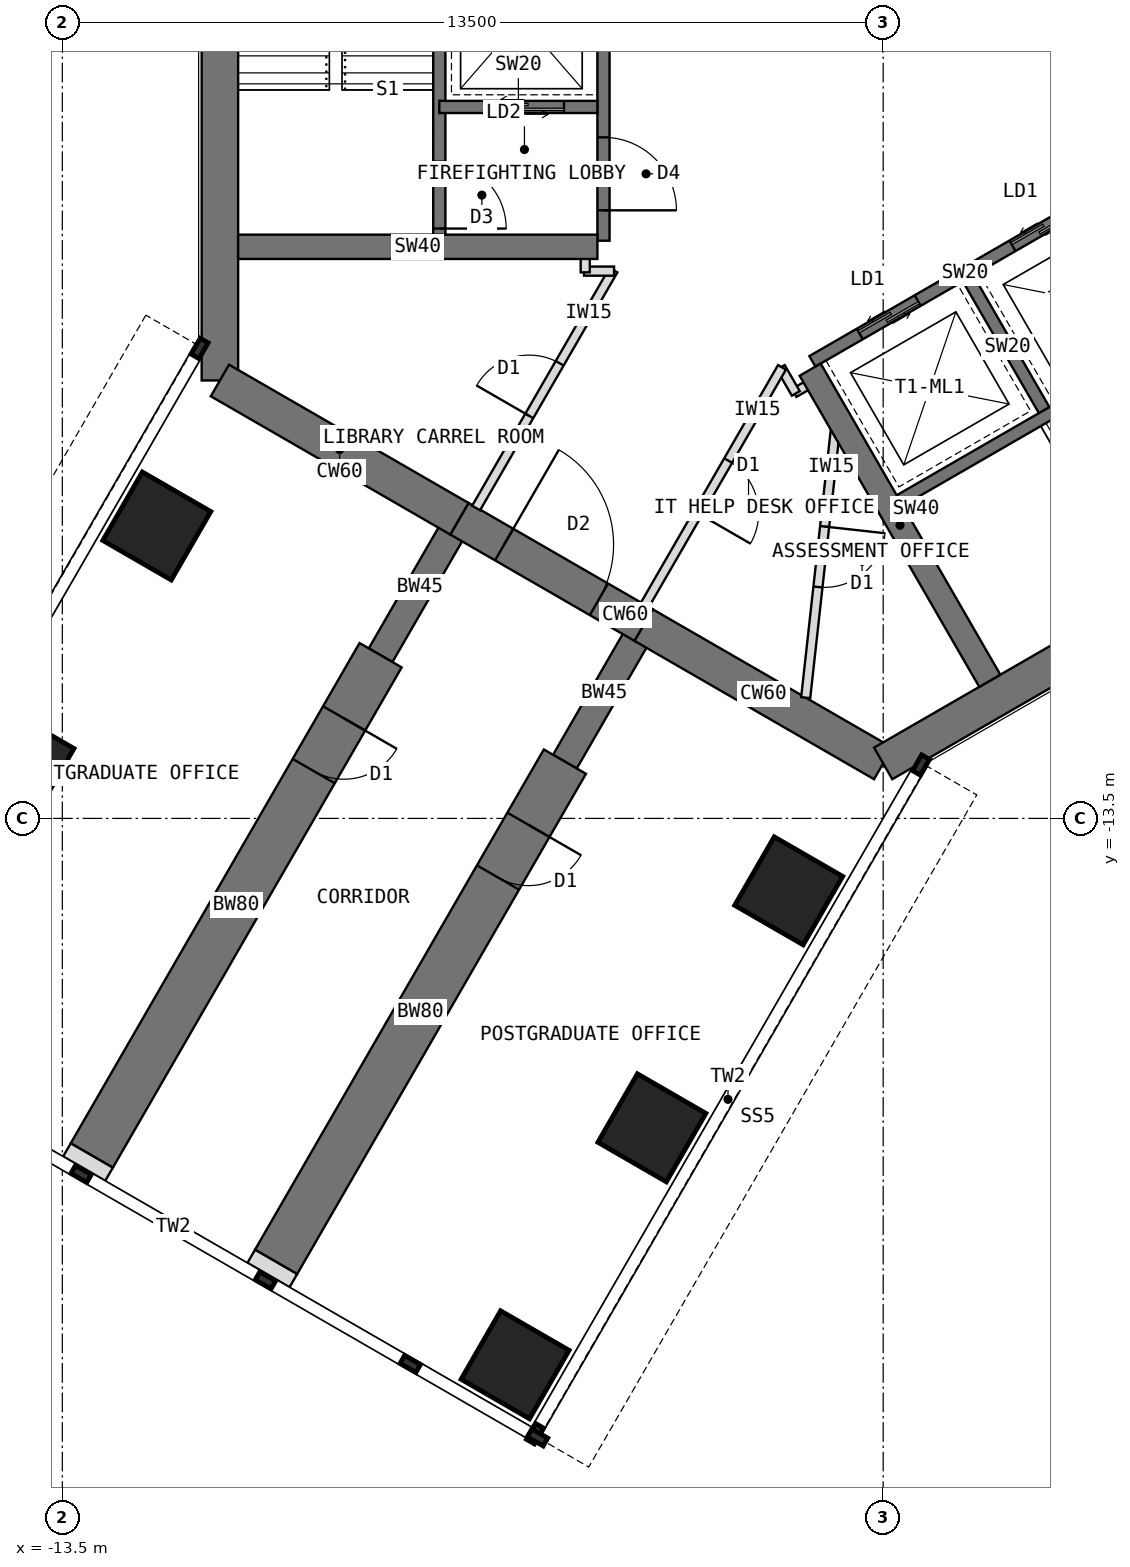
"""IFC4 building model, lengths in metres.
Left out: names, types, materials, properties, quantities, classifications, styles, units other than length and angle.
Written with IfcOpenShell. Run it as: python <this file> out.ifc"""

import sys

from ifc_helpers import new_model, si_unit, direction, frame, frame_2d, origin, origin_2d, place, context, subcontext, project, spatial, rectangle, extrude, element, fill, save


model = new_model("IFC4")
c1 = context("Model", 3, precision=1e-05, world=origin(), true_north=direction((0.0, 1.0)))
c2 = subcontext(c1, "Body", "Model", "MODEL_VIEW")
j1 = project(units=[si_unit("LENGTHUNIT", "METRE"), si_unit("PLANEANGLEUNIT", "RADIAN")], contexts=[c1])
p1 = place(None, origin())
s1 = spatial("IfcSite", under=j1, at=p1, CompositionType="ELEMENT")
p2 = place(p1, origin())
s2 = spatial("IfcBuilding", under=s1, at=p2, CompositionType="ELEMENT")
p3 = place(p2, frame((0.0, 0.0, 125.5)))
s3 = spatial("IfcBuildingStorey", under=s2, at=p3, CompositionType="ELEMENT", Elevation=125.5)
p4 = place(p3, frame((-10.908, 6.298, 0.0), z_axis=(0.0, 0.0, 1.0), x_axis=(0.0, -1.0, 0.0)))
e1 = element("IfcWall", 1, at=p4, inside=s3, PredefinedType="SHEAR", context=c2, shape_type="SweptSolid", body=[
    extrude(rectangle(XDim=12.596, YDim=0.6, at=frame_2d((6.298, 0.0))), origin(), (0.0, 0.0, 1.0), 4.0),
])
p5 = place(p3, frame((-10.908, -6.298, 0.0), z_axis=(0.0, 0.0, 1.0), x_axis=(0.866034513004, -0.499984222037, 0.0)))
e2 = element("IfcWall", 2, at=p5, inside=s3, PredefinedType="SHEAR", context=c2, shape_type="SweptSolid", body=[
    extrude(rectangle(XDim=4.548, YDim=0.6, at=frame_2d((2.274, 0.0))), origin(), (0.0, 0.0, 1.0), 4.0),
])
p6 = place(p3, frame((-6.97, -8.572, 0.0), z_axis=(0.0, 0.0, 1.0), x_axis=(0.866019471182, -0.500010275428, 0.0)))
e3 = element("IfcWall", 3, at=p6, inside=s3, PredefinedType="SHEAR", context=c2, shape_type="SweptSolid", body=[
    extrude(rectangle(XDim=3.5, YDim=0.6, at=frame_2d((1.75, 0.0))), origin(), (0.0, 0.0, 1.0), 4.0),
])
p7 = place(p6, frame((0.85, 0.0, 0.0)))
e4 = element("IfcOpeningElement", 4, at=p7, cuts=e3, PredefinedType="OPENING", context=c2, shape_type="SweptSolid", body=[
    extrude(rectangle(XDim=1.8, YDim=2.1, at=frame_2d((0.9, 1.05))), frame((0.0, 0.31, 0.0), z_axis=(0.0, -1.0, 0.0), x_axis=(1.0, 0.0, 0.0)), (0.0, 0.0, 1.0), 0.62),
])
p8 = place(p3, frame((-3.939, -10.322, 0.0), z_axis=(0.0, 0.0, 1.0), x_axis=(0.866011268655, -0.500024481964, 0.0)))
e5 = element("IfcWall", 5, at=p8, inside=s3, PredefinedType="SHEAR", context=c2, shape_type="SweptSolid", body=[
    extrude(rectangle(XDim=4.548, YDim=0.6, at=frame_2d((2.274, 0.0))), origin(), (0.0, 0.0, 1.0), 4.0),
])
p9 = place(p3, frame((0.0, -12.596, 0.0), z_axis=(0.0, 0.0, 1.0), x_axis=(0.866021940709, 0.500005998175, 0.0)))
e6 = element("IfcWall", 6, at=p9, inside=s3, PredefinedType="SHEAR", context=c2, shape_type="SweptSolid", body=[
    extrude(rectangle(XDim=12.596, YDim=0.6, at=frame_2d((6.298, 0.0))), origin(), (0.0, 0.0, 1.0), 4.0),
])
p10 = place(p3, frame((-3.939, -10.322, 0.0), z_axis=(0.0, 0.0, 1.0), x_axis=(-0.499918158782, -0.866072649678, 0.0)))
e7 = element("IfcWall", 7, at=p10, inside=s3, PredefinedType="SHEAR", context=c2, shape_type="SweptSolid", body=[
    extrude(rectangle(XDim=2.592, YDim=0.45, at=frame_2d((1.296, 0.0))), origin(), (0.0, 0.0, 1.0), 4.0),
])
p11 = place(p3, frame((-5.234, -12.566, 0.0), z_axis=(0.0, 0.0, 1.0), x_axis=(-0.499997557548, -0.86602681393, 0.0)))
e8 = element("IfcWall", 8, at=p11, inside=s3, PredefinedType="SHEAR", context=c2, shape_type="SweptSolid", body=[
    extrude(rectangle(XDim=9.5, YDim=0.8, at=frame_2d((4.75, 0.0))), origin(), (0.0, 0.0, 1.0), 4.0),
])
p12 = place(p11, frame((1.2, 0.0, 0.0)))
e9 = element("IfcOpeningElement", 9, at=p12, cuts=e8, PredefinedType="OPENING", context=c2, shape_type="SweptSolid", body=[
    extrude(rectangle(XDim=1.0, YDim=2.1, at=frame_2d((0.5, 1.05))), frame((0.0, 0.41, 0.0), z_axis=(0.0, -1.0, 0.0), x_axis=(1.0, 0.0, 0.0)), (0.0, 0.0, 1.0), 0.82),
])
p13 = place(p3, frame((-6.97, -8.572, 0.0), z_axis=(0.0, 0.0, 1.0), x_axis=(-0.499988811324, -0.866031863473, 0.0)))
e10 = element("IfcWall", 10, at=p13, inside=s3, PredefinedType="SHEAR", context=c2, shape_type="SweptSolid", body=[
    extrude(rectangle(XDim=2.592, YDim=0.45, at=frame_2d((1.296, 0.0))), origin(), (0.0, 0.0, 1.0), 4.0),
])
p14 = place(p3, frame((-8.266, -10.816, 0.0), z_axis=(0.0, 0.0, 1.0), x_axis=(-0.499997557548, -0.86602681393, 0.0)))
e11 = element("IfcWall", 11, at=p14, inside=s3, PredefinedType="SHEAR", context=c2, shape_type="SweptSolid", body=[
    extrude(rectangle(XDim=9.5, YDim=0.8, at=frame_2d((4.75, 0.0))), origin(), (0.0, 0.0, 1.0), 4.0),
])
p15 = place(p14, frame((1.2, 0.0, 0.0)))
e12 = element("IfcOpeningElement", 12, at=p15, cuts=e11, PredefinedType="OPENING", context=c2, shape_type="SweptSolid", body=[
    extrude(rectangle(XDim=1.0, YDim=2.1, at=frame_2d((0.5, 1.05))), frame((0.0, 0.41, 0.0), z_axis=(0.0, -1.0, 0.0), x_axis=(1.0, 0.0, 0.0)), (0.0, 0.0, 1.0), 0.82),
])
for number, where, z_axis, x_axis in (
    (13, (-1.554, -14.691, 0.0), (0.0, 0.0, 1.0), (0.5, 0.866, 0.0)),
    (14, (-11.946, -8.691, 0.0), (0.0, 0.0, 1.0), (0.5, 0.866, 0.0)),
    (15, (-3.804, -18.588, 0.0), (0.0, 0.0, 1.0), (0.5, 0.866, 0.0)),
    (16, (-14.196, -12.588, 0.0), (0.0, 0.0, 1.0), (0.5, 0.866, 0.0)),
    (17, (-6.054, -22.486, 0.0), (0.0, 0.0, 1.0), (0.5, 0.866, 0.0)),
):
    element("IfcColumn", number, at=place(p3, frame(where, z_axis=z_axis, x_axis=x_axis)), inside=s3, PredefinedType="COLUMN", context=c2, shape_type="SweptSolid", body=[
        extrude(rectangle(XDim=1.3, YDim=1.3, at=origin_2d()), origin(), (0.0, 0.0, 1.0), 4.0),
    ])
for number, where, z_axis, x_axis in (
    (18, (-9.984, -20.794, 0.0), (0.0, 0.0, 1.0), (-0.5, -0.866, 0.0)),
    (19, (-13.016, -19.044, 0.0), (0.0, 0.0, 1.0), (-0.5, -0.866, 0.0)),
):
    element("IfcWall", number, at=place(p3, frame(where, z_axis=z_axis, x_axis=x_axis)), inside=s3, PredefinedType="PARTITIONING", context=c2, shape_type="SweptSolid", body=[
        extrude(rectangle(XDim=0.25, YDim=0.8, at=frame_2d((0.125, 0.0))), origin(), (0.0, 0.0, 1.0), 3.8),
    ])
p16 = place(p3, frame((-4.6, 4.0, 0.0), z_axis=(0.0, 0.0, 1.0), x_axis=(0.0, -1.0, 0.0)))
e20 = element("IfcWall", 20, at=p16, inside=s3, PredefinedType="SHEAR", context=c2, shape_type="SweptSolid", body=[
    extrude(rectangle(XDim=8.0, YDim=0.2, at=frame_2d((4.0, 0.0))), origin(), (0.0, 0.0, 1.0), 4.0),
])
p17 = place(p16, frame((6.3, 0.0, 0.0)))
e21 = element("IfcOpeningElement", 21, at=p17, cuts=e20, PredefinedType="OPENING", context=c2, shape_type="SweptSolid", body=[
    extrude(rectangle(XDim=1.2, YDim=2.1, at=frame_2d((0.6, 1.05))), frame((0.0, 0.11, 0.0), z_axis=(0.0, -1.0, 0.0), x_axis=(1.0, 0.0, 0.0)), (0.0, 0.0, 1.0), 0.22),
])
p18 = place(p16, frame((0.9, 0.0, 0.0)))
e22 = element("IfcOpeningElement", 22, at=p18, cuts=e20, PredefinedType="OPENING", context=c2, shape_type="SweptSolid", body=[
    extrude(rectangle(XDim=1.1, YDim=2.2, at=frame_2d((0.55, 1.1))), frame((0.0, 0.11, 0.0), z_axis=(0.0, -1.0, 0.0), x_axis=(1.0, 0.0, 0.0)), (0.0, 0.0, 1.0), 0.22),
])
p19 = place(p3, frame((-4.7, -1.8, 0.0), z_axis=(0.0, 0.0, 1.0), x_axis=(-1.0, 0.0, 0.0)))
e23 = element("IfcWall", 23, at=p19, inside=s3, PredefinedType="SHEAR", context=c2, shape_type="SweptSolid", body=[
    extrude(rectangle(XDim=2.6, YDim=0.2, at=frame_2d((1.3, 0.0))), origin(), (0.0, 0.0, 1.0), 4.0),
])
p20 = place(p19, frame((0.55, 0.0, 0.0)))
e24 = element("IfcOpeningElement", 24, at=p20, cuts=e23, PredefinedType="OPENING", context=c2, shape_type="SweptSolid", body=[
    extrude(rectangle(XDim=1.3, YDim=2.2, at=frame_2d((0.65, 1.1))), frame((0.0, 0.11, 0.0), z_axis=(0.0, -1.0, 0.0), x_axis=(1.0, 0.0, 0.0)), (0.0, 0.0, 1.0), 0.22),
])
p21 = place(p3, frame((-7.3, 4.0, 0.0), z_axis=(0.0, 0.0, 1.0), x_axis=(0.0, -1.0, 0.0)))
e25 = element("IfcWall", 25, at=p21, inside=s3, PredefinedType="SHEAR", context=c2, shape_type="SweptSolid", body=[
    extrude(rectangle(XDim=8.0, YDim=0.2, at=frame_2d((4.0, 0.0))), origin(), (0.0, 0.0, 1.0), 4.0),
])
p22 = place(p21, frame((6.7, 0.0, 0.0)))
e26 = element("IfcOpeningElement", 26, at=p22, cuts=e25, PredefinedType="OPENING", context=c2, shape_type="SweptSolid", body=[
    extrude(rectangle(XDim=1.1, YDim=2.1, at=frame_2d((0.55, 1.05))), frame((0.0, 0.11, 0.0), z_axis=(0.0, -1.0, 0.0), x_axis=(1.0, 0.0, 0.0)), (0.0, 0.0, 1.0), 0.22),
])
p23 = place(p3, frame((-4.7, -4.1, 0.0), z_axis=(0.0, 0.0, 1.0), x_axis=(-1.0, 0.0, 0.0)))
e27 = element("IfcWall", 27, at=p23, inside=s3, PredefinedType="SHEAR", context=c2, shape_type="SweptSolid", body=[
    extrude(rectangle(XDim=5.908, YDim=0.4, at=frame_2d((2.954, 0.0))), origin(), (0.0, 0.0, 1.0), 4.0),
])
p24 = place(p3, frame((-1.164, -5.984, 0.0), z_axis=(0.0, 0.0, 1.0), x_axis=(0.866026010844, 0.49999894854, 0.0)))
e28 = element("IfcWall", 28, at=p24, inside=s3, PredefinedType="SHEAR", context=c2, shape_type="SweptSolid", body=[
    extrude(rectangle(XDim=8.0, YDim=0.2, at=frame_2d((4.0, 0.0))), origin(), (0.0, 0.0, 1.0), 4.0),
])
p25 = place(p24, frame((6.3, 0.0, 0.0)))
e29 = element("IfcOpeningElement", 29, at=p25, cuts=e28, PredefinedType="OPENING", context=c2, shape_type="SweptSolid", body=[
    extrude(rectangle(XDim=1.2, YDim=2.1, at=frame_2d((0.6, 1.05))), frame((0.0, 0.11, 0.0), z_axis=(0.0, -1.0, 0.0), x_axis=(1.0, 0.0, 0.0)), (0.0, 0.0, 1.0), 0.22),
])
p26 = place(p24, frame((0.9, 0.0, 0.0)))
e30 = element("IfcOpeningElement", 30, at=p26, cuts=e28, PredefinedType="OPENING", context=c2, shape_type="SweptSolid", body=[
    extrude(rectangle(XDim=1.1, YDim=2.2, at=frame_2d((0.55, 1.1))), frame((0.0, 0.11, 0.0), z_axis=(0.0, -1.0, 0.0), x_axis=(1.0, 0.0, 0.0)), (0.0, 0.0, 1.0), 0.22),
])
p27 = place(p24, frame((3.8, 0.0, 0.0)))
e31 = element("IfcOpeningElement", 31, at=p27, cuts=e28, PredefinedType="OPENING", context=c2, shape_type="SweptSolid", body=[
    extrude(rectangle(XDim=1.1, YDim=2.2, at=frame_2d((0.55, 1.1))), frame((0.0, 0.11, 0.0), z_axis=(0.0, -1.0, 0.0), x_axis=(1.0, 0.0, 0.0)), (0.0, 0.0, 1.0), 0.22),
])
p28 = place(p3, frame((1.397, -4.62, 0.0), z_axis=(0.0, 0.0, 1.0), x_axis=(0.499936506574, -0.866062058628, 0.0)))
e32 = element("IfcWall", 32, at=p28, inside=s3, PredefinedType="SHEAR", context=c2, shape_type="SweptSolid", body=[
    extrude(rectangle(XDim=2.6, YDim=0.2, at=frame_2d((1.3, 0.0))), origin(), (0.0, 0.0, 1.0), 4.0),
])
p29 = place(p3, frame((0.186, -8.322, 0.0), z_axis=(0.0, 0.0, 1.0), x_axis=(0.866026010844, 0.49999894854, 0.0)))
e33 = element("IfcWall", 33, at=p29, inside=s3, PredefinedType="SHEAR", context=c2, shape_type="SweptSolid", body=[
    extrude(rectangle(XDim=8.0, YDim=0.2, at=frame_2d((4.0, 0.0))), origin(), (0.0, 0.0, 1.0), 4.0),
])
p30 = place(p29, frame((6.7, 0.0, 0.0)))
e34 = element("IfcOpeningElement", 34, at=p30, cuts=e33, PredefinedType="OPENING", context=c2, shape_type="SweptSolid", body=[
    extrude(rectangle(XDim=1.1, YDim=2.1, at=frame_2d((0.55, 1.05))), frame((0.0, 0.11, 0.0), z_axis=(0.0, -1.0, 0.0), x_axis=(1.0, 0.0, 0.0)), (0.0, 0.0, 1.0), 0.22),
])
p31 = place(p3, frame((-1.201, -6.12, 0.0), z_axis=(0.0, 0.0, 1.0), x_axis=(0.49999668571, -0.866027317282, 0.0)))
e35 = element("IfcWall", 35, at=p31, inside=s3, PredefinedType="SHEAR", context=c2, shape_type="SweptSolid", body=[
    extrude(rectangle(XDim=5.908, YDim=0.4, at=frame_2d((2.954, 0.0))), origin(), (0.0, 0.0, 1.0), 4.0),
])
p32 = place(p3, frame((-1.092, -6.289, 0.0), z_axis=(0.0, 0.0, 1.0), x_axis=(-0.866138304741, -0.499804398801, 0.0)))
e36 = element("IfcWall", 36, at=p32, inside=s3, PredefinedType="PARTITIONING", context=c2, shape_type="SweptSolid", body=[
    extrude(rectangle(XDim=0.43, YDim=0.15, at=frame_2d((0.215, 0.0))), origin(), (0.0, 0.0, 1.0), 3.8),
])
p33 = place(p3, frame((-1.437, -6.511, 0.0), z_axis=(0.0, 0.0, 1.0), x_axis=(-0.50033519877, 0.865831790172, 0.0)))
e37 = element("IfcWall", 37, at=p33, inside=s3, PredefinedType="PARTITIONING", context=c2, shape_type="SweptSolid", body=[
    extrude(rectangle(XDim=0.494, YDim=0.15, at=frame_2d((0.247, 0.0))), origin(), (0.0, 0.0, 1.0), 3.8),
])
p34 = place(p3, frame((-1.664, -6.083, 0.0), z_axis=(0.0, 0.0, 1.0), x_axis=(-0.500032713409, -0.866006515865, 0.0)))
e38 = element("IfcWall", 38, at=p34, inside=s3, PredefinedType="PARTITIONING", context=c2, shape_type="SweptSolid", body=[
    extrude(rectangle(XDim=4.518, YDim=0.15, at=frame_2d((2.259, 0.0))), origin(), (0.0, 0.0, 1.0), 3.8),
])
p35 = place(p34, frame((1.769, 0.0, 0.0)))
e39 = element("IfcOpeningElement", 39, at=p35, cuts=e38, PredefinedType="OPENING", context=c2, shape_type="SweptSolid", body=[
    extrude(rectangle(XDim=1.0, YDim=2.1, at=frame_2d((0.5, 1.05))), frame((0.0, 0.085, 0.0), z_axis=(0.0, -1.0, 0.0), x_axis=(1.0, 0.0, 0.0)), (0.0, 0.0, 1.0), 0.17),
])
p36 = place(p3, frame((-6.695, -8.396, 0.0), z_axis=(0.0, 0.0, 1.0), x_axis=(0.500009315796, 0.86602002524, 0.0)))
e40 = element("IfcWall", 40, at=p36, inside=s3, PredefinedType="PARTITIONING", context=c2, shape_type="SweptSolid", body=[
    extrude(rectangle(XDim=4.519, YDim=0.15, at=frame_2d((2.259, 0.0))), origin(), (0.0, 0.0, 1.0), 3.8),
])
p37 = place(p36, frame((1.749, 0.0, 0.0)))
e41 = element("IfcOpeningElement", 41, at=p37, cuts=e40, PredefinedType="OPENING", context=c2, shape_type="SweptSolid", body=[
    extrude(rectangle(XDim=1.0, YDim=2.1, at=frame_2d((0.5, 1.05))), frame((0.0, 0.085, 0.0), z_axis=(0.0, -1.0, 0.0), x_axis=(1.0, 0.0, 0.0)), (0.0, 0.0, 1.0), 0.17),
])
p38 = place(p3, frame((-4.426, -4.5, 0.0), z_axis=(0.0, 0.0, 1.0), x_axis=(-1.0, 0.0, 0.0)))
e42 = element("IfcWall", 42, at=p38, inside=s3, PredefinedType="PARTITIONING", context=c2, shape_type="SweptSolid", body=[
    extrude(rectangle(XDim=0.494, YDim=0.15, at=frame_2d((0.247, 0.0))), origin(), (0.0, 0.0, 1.0), 3.8),
])
p39 = place(p3, frame((-4.9, -4.52, 0.0), z_axis=(0.0, 0.0, 1.0), x_axis=(0.0, 1.0, 0.0)))
e43 = element("IfcWall", 43, at=p39, inside=s3, PredefinedType="PARTITIONING", context=c2, shape_type="SweptSolid", body=[
    extrude(rectangle(XDim=0.43, YDim=0.15, at=frame_2d((0.215, 0.0))), origin(), (0.0, 0.0, 1.0), 3.8),
])
p40 = place(p3, frame((-0.761, -6.881, 0.0), z_axis=(0.0, 0.0, 1.0), x_axis=(-0.109994603044, -0.993932184458, 0.0)))
e44 = element("IfcWall", 44, at=p40, inside=s3, PredefinedType="PARTITIONING", context=c2, shape_type="SweptSolid", body=[
    extrude(rectangle(XDim=4.661, YDim=0.15, at=frame_2d((2.331, 0.0))), origin(), (0.0, 0.0, 1.0), 3.8),
])
p41 = place(p40, frame((1.831, 0.0, 0.0)))
e45 = element("IfcOpeningElement", 45, at=p41, cuts=e44, PredefinedType="OPENING", context=c2, shape_type="SweptSolid", body=[
    extrude(rectangle(XDim=1.0, YDim=2.1, at=frame_2d((0.5, 1.05))), frame((0.0, 0.085, 0.0), z_axis=(0.0, -1.0, 0.0), x_axis=(1.0, 0.0, 0.0)), (0.0, 0.0, 1.0), 0.17),
])
p42 = place(p17, origin())
e46 = element("IfcDoor", 46, at=p42, inside=s3, OperationType="SINGLE_SWING_RIGHT", PredefinedType="DOOR", context=c2, shape_type="SweptSolid", body=[
    extrude(rectangle(XDim=1.2, YDim=2.1, at=frame_2d((0.6, 1.05))), frame((0.0, 0.025, 0.0), z_axis=(0.0, -1.0, 0.0), x_axis=(1.0, 0.0, 0.0)), (0.0, 0.0, 1.0), 0.05),
])
fill(e21, e46)
p43 = place(p20, origin())
e47 = element("IfcDoor", 47, at=p43, inside=s3, OperationType="DOUBLE_DOOR_SLIDING", PredefinedType="DOOR", context=c2, shape_type="SweptSolid", body=[
    extrude(rectangle(XDim=1.3, YDim=2.2, at=frame_2d((0.65, 1.1))), frame((0.0, 0.025, 0.0), z_axis=(0.0, -1.0, 0.0), x_axis=(1.0, 0.0, 0.0)), (0.0, 0.0, 1.0), 0.05),
])
fill(e24, e47)
p44 = place(p22, origin())
e48 = element("IfcDoor", 48, at=p44, inside=s3, OperationType="SINGLE_SWING_RIGHT", PredefinedType="DOOR", context=c2, shape_type="SweptSolid", body=[
    extrude(rectangle(XDim=1.1, YDim=2.1, at=frame_2d((0.55, 1.05))), frame((0.0, 0.025, 0.0), z_axis=(0.0, -1.0, 0.0), x_axis=(1.0, 0.0, 0.0)), (0.0, 0.0, 1.0), 0.05),
])
fill(e26, e48)
p45 = place(p26, origin())
e49 = element("IfcDoor", 49, at=p45, inside=s3, OperationType="DOUBLE_DOOR_SLIDING", PredefinedType="DOOR", context=c2, shape_type="SweptSolid", body=[
    extrude(rectangle(XDim=1.1, YDim=2.2, at=frame_2d((0.55, 1.1))), frame((0.0, 0.025, 0.0), z_axis=(0.0, -1.0, 0.0), x_axis=(1.0, 0.0, 0.0)), (0.0, 0.0, 1.0), 0.05),
])
fill(e30, e49)
p46 = place(p27, origin())
e50 = element("IfcDoor", 50, at=p46, inside=s3, OperationType="DOUBLE_DOOR_SLIDING", PredefinedType="DOOR", context=c2, shape_type="SweptSolid", body=[
    extrude(rectangle(XDim=1.1, YDim=2.2, at=frame_2d((0.55, 1.1))), frame((0.0, 0.025, 0.0), z_axis=(0.0, -1.0, 0.0), x_axis=(1.0, 0.0, 0.0)), (0.0, 0.0, 1.0), 0.05),
])
fill(e31, e50)
p47 = place(p7, origin())
e51 = element("IfcDoor", 51, at=p47, inside=s3, OperationType="DOUBLE_DOOR_DOUBLE_SWING", PredefinedType="DOOR", context=c2, shape_type="SweptSolid", body=[
    extrude(rectangle(XDim=1.72, YDim=2.06, at=frame_2d((0.9, 1.03))), frame((0.0, 0.025, 0.0), z_axis=(0.0, -1.0, 0.0), x_axis=(1.0, 0.0, 0.0)), (0.0, 0.0, 1.0), 0.05),
    extrude(rectangle(XDim=0.04, YDim=2.1, at=frame_2d((0.02, 1.05))), frame((0.0, 0.3, 0.0), z_axis=(0.0, -1.0, 0.0), x_axis=(1.0, 0.0, 0.0)), (0.0, 0.0, 1.0), 0.6),
    extrude(rectangle(XDim=0.04, YDim=2.1, at=frame_2d((1.78, 1.05))), frame((0.0, 0.3, 0.0), z_axis=(0.0, -1.0, 0.0), x_axis=(1.0, 0.0, 0.0)), (0.0, 0.0, 1.0), 0.6),
    extrude(rectangle(XDim=1.72, YDim=0.04, at=frame_2d((0.9, 2.08))), frame((0.0, 0.3, 0.0), z_axis=(0.0, -1.0, 0.0), x_axis=(1.0, 0.0, 0.0)), (0.0, 0.0, 1.0), 0.6),
])
fill(e4, e51)
p48 = place(p37, origin())
e52 = element("IfcDoor", 52, at=p48, inside=s3, OperationType="SINGLE_SWING_LEFT", PredefinedType="DOOR", context=c2, shape_type="SweptSolid", body=[
    extrude(rectangle(XDim=1.0, YDim=2.1, at=frame_2d((0.5, 1.05))), frame((0.0, 0.025, 0.0), z_axis=(0.0, -1.0, 0.0), x_axis=(1.0, 0.0, 0.0)), (0.0, 0.0, 1.0), 0.05),
])
fill(e41, e52)
p49 = place(p35, origin())
e53 = element("IfcDoor", 53, at=p49, inside=s3, OperationType="SINGLE_SWING_RIGHT", PredefinedType="DOOR", context=c2, shape_type="SweptSolid", body=[
    extrude(rectangle(XDim=1.0, YDim=2.1, at=frame_2d((0.5, 1.05))), frame((0.0, 0.025, 0.0), z_axis=(0.0, -1.0, 0.0), x_axis=(1.0, 0.0, 0.0)), (0.0, 0.0, 1.0), 0.05),
])
fill(e39, e53)
p50 = place(p41, origin())
e54 = element("IfcDoor", 54, at=p50, inside=s3, OperationType="SINGLE_SWING_LEFT", PredefinedType="DOOR", context=c2, shape_type="SweptSolid", body=[
    extrude(rectangle(XDim=1.0, YDim=2.1, at=frame_2d((0.5, 1.05))), frame((0.0, 0.025, 0.0), z_axis=(0.0, -1.0, 0.0), x_axis=(1.0, 0.0, 0.0)), (0.0, 0.0, 1.0), 0.05),
])
fill(e45, e54)
p51 = place(p12, origin())
e55 = element("IfcDoor", 55, at=p51, inside=s3, OperationType="SINGLE_SWING_LEFT", PredefinedType="DOOR", context=c2, shape_type="SweptSolid", body=[
    extrude(rectangle(XDim=0.92, YDim=2.06, at=frame_2d((0.5, 1.03))), frame((0.0, 0.025, 0.0), z_axis=(0.0, -1.0, 0.0), x_axis=(1.0, 0.0, 0.0)), (0.0, 0.0, 1.0), 0.05),
    extrude(rectangle(XDim=0.04, YDim=2.1, at=frame_2d((0.02, 1.05))), frame((0.0, 0.4, 0.0), z_axis=(0.0, -1.0, 0.0), x_axis=(1.0, 0.0, 0.0)), (0.0, 0.0, 1.0), 0.8),
    extrude(rectangle(XDim=0.04, YDim=2.1, at=frame_2d((0.98, 1.05))), frame((0.0, 0.4, 0.0), z_axis=(0.0, -1.0, 0.0), x_axis=(1.0, 0.0, 0.0)), (0.0, 0.0, 1.0), 0.8),
    extrude(rectangle(XDim=0.92, YDim=0.04, at=frame_2d((0.5, 2.08))), frame((0.0, 0.4, 0.0), z_axis=(0.0, -1.0, 0.0), x_axis=(1.0, 0.0, 0.0)), (0.0, 0.0, 1.0), 0.8),
])
fill(e9, e55)
p52 = place(p15, origin())
e56 = element("IfcDoor", 56, at=p52, inside=s3, OperationType="SINGLE_SWING_LEFT", PredefinedType="DOOR", context=c2, shape_type="SweptSolid", body=[
    extrude(rectangle(XDim=0.92, YDim=2.06, at=frame_2d((0.5, 1.03))), frame((0.0, 0.025, 0.0), z_axis=(0.0, -1.0, 0.0), x_axis=(1.0, 0.0, 0.0)), (0.0, 0.0, 1.0), 0.05),
    extrude(rectangle(XDim=0.04, YDim=2.1, at=frame_2d((0.02, 1.05))), frame((0.0, 0.4, 0.0), z_axis=(0.0, -1.0, 0.0), x_axis=(1.0, 0.0, 0.0)), (0.0, 0.0, 1.0), 0.8),
    extrude(rectangle(XDim=0.04, YDim=2.1, at=frame_2d((0.98, 1.05))), frame((0.0, 0.4, 0.0), z_axis=(0.0, -1.0, 0.0), x_axis=(1.0, 0.0, 0.0)), (0.0, 0.0, 1.0), 0.8),
    extrude(rectangle(XDim=0.92, YDim=0.04, at=frame_2d((0.5, 2.08))), frame((0.0, 0.4, 0.0), z_axis=(0.0, -1.0, 0.0), x_axis=(1.0, 0.0, 0.0)), (0.0, 0.0, 1.0), 0.8),
])
fill(e12, e56)
save(model, sys.argv[1])
